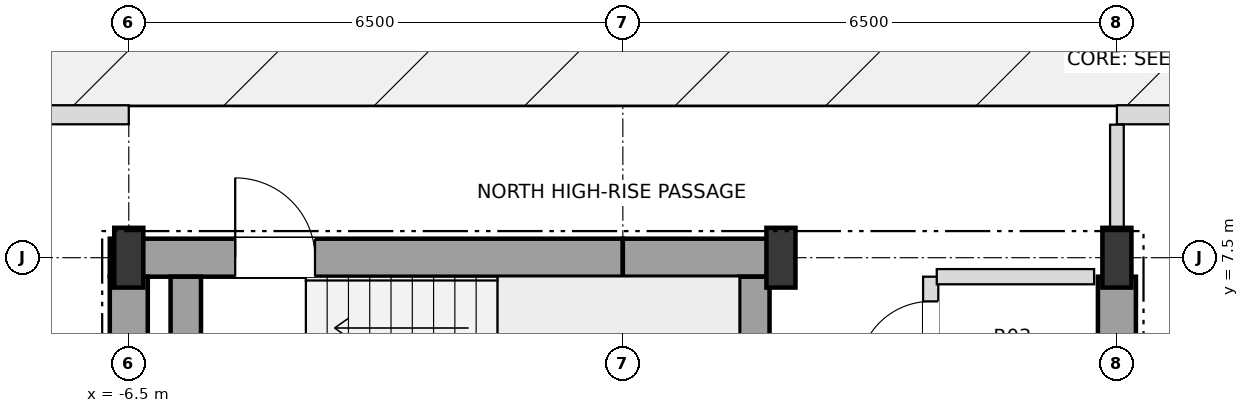
"""IFC4 building model, lengths in metres.
Left out: names, types, materials, properties, quantities, classifications, styles, units other than length and angle.
Written with IfcOpenShell. Run it as: python <this file> out.ifc"""

import sys

from ifc_helpers import new_model, si_unit, direction, frame, frame_2d, origin, origin_2d, place, context, subcontext, project, spatial, rectangle, i_section, extrude, element, fill, save


model = new_model("IFC4")
c1 = context("Model", 3, precision=1e-05, world=origin(), true_north=direction((0.0, 1.0)))
c2 = subcontext(c1, "Body", "Model", "MODEL_VIEW")
j1 = project(units=[si_unit("LENGTHUNIT", "METRE"), si_unit("PLANEANGLEUNIT", "RADIAN")], contexts=[c1])
p1 = place(None, origin())
s1 = spatial("IfcSite", under=j1, at=p1, CompositionType="ELEMENT")
p2 = place(p1, origin())
s2 = spatial("IfcBuilding", under=s1, at=p2, CompositionType="ELEMENT")
p3 = place(p2, frame((0.0, 0.0, 261.9)))
s3 = spatial("IfcBuildingStorey", under=s2, at=p3, CompositionType="ELEMENT", Elevation=261.9)
for number, where, z_axis, x_axis in (
    (1, (-6.5, 7.5, 0.0), (0.0, 0.0, 1.0), (1.0, 0.0, 0.0)),
    (2, (2.08, 7.5, 0.0), (0.0, 0.0, 1.0), (1.0, 0.0, 0.0)),
    (3, (6.5, 7.5, 0.0), (0.0, 0.0, 1.0), (1.0, 0.0, 0.0)),
):
    element("IfcColumn", number, at=place(p3, frame(where, z_axis=z_axis, x_axis=x_axis)), inside=s3, PredefinedType="COLUMN", context=c2, shape_type="SweptSolid", body=[
        extrude(i_section(OverallWidth=0.382, OverallDepth=0.786, WebThickness=0.02, FlangeThickness=0.033, at=origin_2d()), origin(), (0.0, 0.0, 1.0), 3.6),
    ])
p4 = place(p3, frame((-16.9, 9.38, 0.0), z_axis=(0.0, 0.0, 1.0), x_axis=(1.0, 0.0, 0.0)))
e4 = element("IfcWall", 4, at=p4, inside=s3, PredefinedType="SOLIDWALL", context=c2, shape_type="SweptSolid", body=[
    extrude(rectangle(XDim=10.4, YDim=0.25, at=frame_2d((5.2, 0.0))), origin(), (0.0, 0.0, 1.0), 3.38),
])
p5 = place(p4, frame((2.0, 0.0, 0.0)))
e5 = element("IfcOpeningElement", 5, at=p5, cuts=e4, PredefinedType="OPENING", context=c2, shape_type="SweptSolid", body=[
    extrude(rectangle(XDim=1.8, YDim=2.3, at=frame_2d((0.9, 1.15))), frame((0.0, 0.135, 0.0), z_axis=(0.0, -1.0, 0.0), x_axis=(1.0, 0.0, 0.0)), (0.0, 0.0, 1.0), 0.27),
])
p6 = place(p3, frame((6.5, 9.38, 0.0), z_axis=(0.0, 0.0, 1.0), x_axis=(1.0, 0.0, 0.0)))
e6 = element("IfcWall", 6, at=p6, inside=s3, PredefinedType="SOLIDWALL", context=c2, shape_type="SweptSolid", body=[
    extrude(rectangle(XDim=10.4, YDim=0.25, at=frame_2d((5.2, 0.0))), origin(), (0.0, 0.0, 1.0), 3.38),
])
p7 = place(p6, frame((0.85, 0.0, 0.72)))
e7 = element("IfcOpeningElement", 7, at=p7, cuts=e6, PredefinedType="OPENING", context=c2, shape_type="SweptSolid", body=[
    extrude(rectangle(XDim=1.8, YDim=1.68, at=frame_2d((0.9, 0.84))), frame((0.0, 0.135, 0.0), z_axis=(0.0, -1.0, 0.0), x_axis=(1.0, 0.0, 0.0)), (0.0, 0.0, 1.0), 0.27),
])
p8 = place(p6, frame((4.405, 0.0, 0.72)))
e8 = element("IfcOpeningElement", 8, at=p8, cuts=e6, PredefinedType="OPENING", context=c2, shape_type="SweptSolid", body=[
    extrude(rectangle(XDim=1.8, YDim=1.68, at=frame_2d((0.9, 0.84))), frame((0.0, 0.135, 0.0), z_axis=(0.0, -1.0, 0.0), x_axis=(1.0, 0.0, 0.0)), (0.0, 0.0, 1.0), 0.27),
])
p9 = place(p6, frame((7.695, 0.0, 0.72)))
e9 = element("IfcOpeningElement", 9, at=p9, cuts=e6, PredefinedType="OPENING", context=c2, shape_type="SweptSolid", body=[
    extrude(rectangle(XDim=1.8, YDim=1.68, at=frame_2d((0.9, 0.84))), frame((0.0, 0.135, 0.0), z_axis=(0.0, -1.0, 0.0), x_axis=(1.0, 0.0, 0.0)), (0.0, 0.0, 1.0), 0.27),
])
p10 = place(p3, frame((-6.75, 7.5, 0.0), z_axis=(0.0, 0.0, 1.0), x_axis=(1.0, 0.0, 0.0)))
e10 = element("IfcWall", 10, at=p10, inside=s3, PredefinedType="SHEAR", context=c2, shape_type="SweptSolid", body=[
    extrude(rectangle(XDim=6.75, YDim=0.5, at=frame_2d((3.375, 0.0))), origin(), (0.0, 0.0, 1.0), 3.38),
])
p11 = place(p10, frame((1.65, 0.0, 0.0)))
e11 = element("IfcOpeningElement", 11, at=p11, cuts=e10, PredefinedType="OPENING", context=c2, shape_type="SweptSolid", body=[
    extrude(rectangle(XDim=1.05, YDim=2.15, at=frame_2d((0.525, 1.075))), frame((0.0, 0.26, 0.0), z_axis=(0.0, -1.0, 0.0), x_axis=(1.0, 0.0, 0.0)), (0.0, 0.0, 1.0), 0.52),
])
p12 = place(p3, frame((0.0, 7.5, 0.0), z_axis=(0.0, 0.0, 1.0), x_axis=(1.0, 0.0, 0.0)))
e12 = element("IfcWall", 12, at=p12, inside=s3, PredefinedType="SHEAR", context=c2, shape_type="SweptSolid", body=[
    extrude(rectangle(XDim=2.08, YDim=0.5, at=frame_2d((1.04, 0.0))), origin(), (0.0, 0.0, 1.0), 3.38),
])
for number, where, z_axis, x_axis in (
    (13, (-6.5, 3.95, 0.0), (0.0, 0.0, 1.0), (0.0, 1.0, 0.0)),
    (14, (6.5, 3.95, 0.0), (0.0, 0.0, 1.0), (0.0, 1.0, 0.0)),
):
    element("IfcWall", number, at=place(p3, frame(where, z_axis=z_axis, x_axis=x_axis)), inside=s3, PredefinedType="SHEAR", context=c2, shape_type="SweptSolid", body=[
        extrude(rectangle(XDim=3.3, YDim=0.5, at=frame_2d((1.65, 0.0))), origin(), (0.0, 0.0, 1.0), 3.38),
    ])
for number, where, z_axis, x_axis in (
    (15, (1.73, 3.95, 0.0), (0.0, 0.0, 1.0), (0.0, 1.0, 0.0)),
    (16, (-5.75, 3.95, 0.0), (0.0, 0.0, 1.0), (0.0, 1.0, 0.0)),
):
    element("IfcWall", number, at=place(p3, frame(where, z_axis=z_axis, x_axis=x_axis)), inside=s3, PredefinedType="SHEAR", context=c2, shape_type="SweptSolid", body=[
        extrude(rectangle(XDim=3.3, YDim=0.4, at=frame_2d((1.65, 0.0))), origin(), (0.0, 0.0, 1.0), 3.38),
    ])
p13 = place(p3, frame((4.05, 0.45, 0.0), z_axis=(0.0, 0.0, 1.0), x_axis=(0.0, 1.0, 0.0)))
e17 = element("IfcWall", 17, at=p13, inside=s3, PredefinedType="SOLIDWALL", context=c2, shape_type="SweptSolid", body=[
    extrude(rectangle(XDim=6.8, YDim=0.2, at=frame_2d((3.4, 0.0))), origin(), (0.0, 0.0, 1.0), 3.38),
])
p14 = place(p13, frame((1.875, 0.0, 0.0)))
e18 = element("IfcOpeningElement", 18, at=p14, cuts=e17, PredefinedType="OPENING", context=c2, shape_type="SweptSolid", body=[
    extrude(rectangle(XDim=0.95, YDim=2.15, at=frame_2d((0.475, 1.075))), frame((0.0, 0.11, 0.0), z_axis=(0.0, -1.0, 0.0), x_axis=(1.0, 0.0, 0.0)), (0.0, 0.0, 1.0), 0.22),
])
p15 = place(p13, frame((5.525, 0.0, 0.0)))
e19 = element("IfcOpeningElement", 19, at=p15, cuts=e17, PredefinedType="OPENING", context=c2, shape_type="SweptSolid", body=[
    extrude(rectangle(XDim=0.95, YDim=2.15, at=frame_2d((0.475, 1.075))), frame((0.0, 0.11, 0.0), z_axis=(0.0, -1.0, 0.0), x_axis=(1.0, 0.0, 0.0)), (0.0, 0.0, 1.0), 0.22),
])
p16 = place(p3, frame((6.5, 7.31, 0.0), z_axis=(0.0, 0.0, 1.0), x_axis=(0.0, 1.0, 0.0)))
e20 = element("IfcWall", 20, at=p16, inside=s3, PredefinedType="PARTITIONING", context=c2, shape_type="SweptSolid", body=[
    extrude(rectangle(XDim=1.94, YDim=0.18, at=frame_2d((0.97, 0.0))), origin(), (0.0, 0.0, 1.0), 2.826),
])
p17 = place(p3, frame((4.13, 7.25, 0.0), z_axis=(0.0, 0.0, 1.0), x_axis=(1.0, 0.0, 0.0)))
e21 = element("IfcWall", 21, at=p17, inside=s3, PredefinedType="SOLIDWALL", context=c2, shape_type="SweptSolid", body=[
    extrude(rectangle(XDim=2.07, YDim=0.2, at=frame_2d((1.035, 0.0))), origin(), (0.0, 0.0, 1.0), 3.38),
])
p18 = place(p11, origin())
e22 = element("IfcDoor", 22, at=p18, inside=s3, OperationType="SINGLE_SWING_LEFT", PredefinedType="DOOR", context=c2, shape_type="SweptSolid", body=[
    extrude(rectangle(XDim=1.05, YDim=2.15, at=frame_2d((0.525, 1.075))), frame((0.0, 0.025, 0.0), z_axis=(0.0, -1.0, 0.0), x_axis=(1.0, 0.0, 0.0)), (0.0, 0.0, 1.0), 0.05),
])
fill(e11, e22)
p19 = place(p15, origin())
e23 = element("IfcDoor", 23, at=p19, inside=s3, OperationType="SINGLE_SWING_LEFT", PredefinedType="DOOR", context=c2, shape_type="SweptSolid", body=[
    extrude(rectangle(XDim=0.95, YDim=2.15, at=frame_2d((0.475, 1.075))), frame((0.0, 0.025, 0.0), z_axis=(0.0, -1.0, 0.0), x_axis=(1.0, 0.0, 0.0)), (0.0, 0.0, 1.0), 0.05),
])
fill(e19, e23)
save(model, sys.argv[1])
